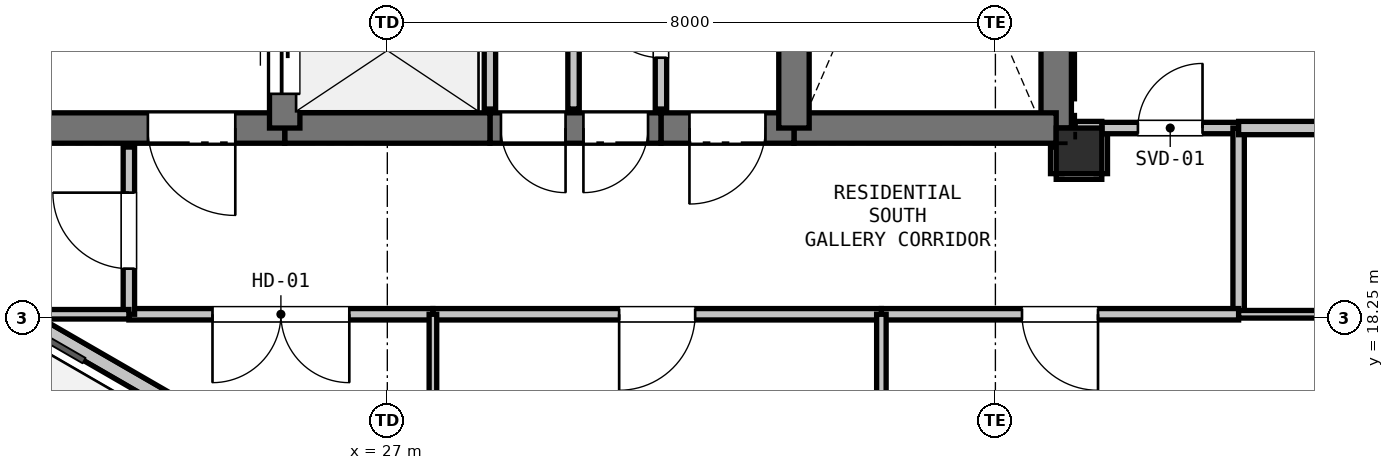
"""IFC4 building model, lengths in metres.
Left out: names, types, materials, properties, quantities, classifications, styles, units other than length and angle.
Written with IfcOpenShell. Run it as: python <this file> out.ifc"""

import sys

from ifc_helpers import new_model, si_unit, direction, frame, frame_2d, origin, origin_2d, place, context, subcontext, project, spatial, rectangle, extrude, element, fill, save


model = new_model("IFC4")
c1 = context("Model", 3, precision=1e-05, world=origin(), true_north=direction((0.0, 1.0)))
c2 = subcontext(c1, "Body", "Model", "MODEL_VIEW")
j1 = project(units=[si_unit("LENGTHUNIT", "METRE"), si_unit("PLANEANGLEUNIT", "RADIAN")], contexts=[c1])
p1 = place(None, origin())
s1 = spatial("IfcSite", under=j1, at=p1, CompositionType="ELEMENT")
p2 = place(p1, origin())
s2 = spatial("IfcBuilding", under=s1, at=p2, CompositionType="ELEMENT")
p3 = place(p2, frame((0.0, 0.0, 246.3)))
s3 = spatial("IfcBuildingStorey", under=s2, at=p3, CompositionType="ELEMENT", Elevation=246.3)
p4 = place(p3, frame((36.1, 20.45, 0.0), z_axis=(0.0, 0.0, 1.0), x_axis=(1.0, 0.0, 0.0)))
e1 = element("IfcColumn", 1, at=p4, inside=s3, PredefinedType="COLUMN", context=c2, shape_type="SweptSolid", body=[
    extrude(rectangle(XDim=0.6, YDim=0.6, at=origin_2d()), origin(), (0.0, 0.0, 1.0), 3.3),
])
p5 = place(p3, frame((27.191, 15.389, 0.0), z_axis=(0.0, 0.0, 1.0), x_axis=(-0.866019557082, 0.500010126649, 0.0)))
e2 = element("IfcWall", 2, at=p5, inside=s3, PredefinedType="PARAPET", context=c2, shape_type="SweptSolid", body=[
    extrude(rectangle(XDim=8.228, YDim=0.2, at=frame_2d((4.114, 0.0))), origin(), (0.0, 0.0, 1.0), 0.2),
])
p6 = place(p3, frame((35.8, 28.1, 0.0), z_axis=(0.0, 0.0, 1.0), x_axis=(0.0, -1.0, 0.0)))
e3 = element("IfcWall", 3, at=p6, inside=s3, PredefinedType="SHEAR", context=c2, shape_type="SweptSolid", body=[
    extrude(rectangle(XDim=7.35, YDim=0.4, at=frame_2d((3.675, 0.0))), origin(), (0.0, 0.0, 1.0), 3.02),
])
p7 = place(p3, frame((35.8, 20.75, 0.0), z_axis=(0.0, 0.0, 1.0), x_axis=(-1.0, 0.0, 0.0)))
e4 = element("IfcWall", 4, at=p7, inside=s3, PredefinedType="SHEAR", context=c2, shape_type="SweptSolid", body=[
    extrude(rectangle(XDim=3.45, YDim=0.4, at=frame_2d((1.725, 0.0))), origin(), (0.0, 0.0, 1.0), 3.02),
])
p8 = place(p3, frame((32.35, 20.75, 0.0), z_axis=(0.0, 0.0, 1.0), x_axis=(-1.0, 0.0, 0.0)))
e5 = element("IfcWall", 5, at=p8, inside=s3, PredefinedType="SHEAR", context=c2, shape_type="SweptSolid", body=[
    extrude(rectangle(XDim=1.75, YDim=0.4, at=frame_2d((0.875, 0.0))), origin(), (0.0, 0.0, 1.0), 3.02),
])
p9 = place(p8, frame((0.375, 0.0, 0.0)))
e6 = element("IfcOpeningElement", 6, at=p9, cuts=e5, PredefinedType="OPENING", context=c2, shape_type="SweptSolid", body=[
    extrude(rectangle(XDim=1.0, YDim=2.15, at=frame_2d((0.5, 1.075))), frame((0.0, 0.21, 0.0), z_axis=(0.0, -1.0, 0.0), x_axis=(1.0, 0.0, 0.0)), (0.0, 0.0, 1.0), 0.42),
])
p10 = place(p3, frame((30.6, 20.75, 0.0), z_axis=(0.0, 0.0, 1.0), x_axis=(-1.0, 0.0, 0.0)))
e7 = element("IfcWall", 7, at=p10, inside=s3, PredefinedType="SHEAR", context=c2, shape_type="SweptSolid", body=[
    extrude(rectangle(XDim=2.25, YDim=0.4, at=frame_2d((1.125, 0.0))), origin(), (0.0, 0.0, 1.0), 3.02),
])
p11 = place(p10, frame((1.255, 0.0, 0.0)))
e8 = element("IfcOpeningElement", 8, at=p11, cuts=e7, PredefinedType="OPENING", context=c2, shape_type="SweptSolid", body=[
    extrude(rectangle(XDim=0.85, YDim=2.1, at=frame_2d((0.425, 1.05))), frame((0.0, 0.21, 0.0), z_axis=(0.0, -1.0, 0.0), x_axis=(1.0, 0.0, 0.0)), (0.0, 0.0, 1.0), 0.42),
])
p12 = place(p10, frame((0.17, 0.0, 0.0)))
e9 = element("IfcOpeningElement", 9, at=p12, cuts=e7, PredefinedType="OPENING", context=c2, shape_type="SweptSolid", body=[
    extrude(rectangle(XDim=0.85, YDim=2.1, at=frame_2d((0.425, 1.05))), frame((0.0, 0.21, 0.0), z_axis=(0.0, -1.0, 0.0), x_axis=(1.0, 0.0, 0.0)), (0.0, 0.0, 1.0), 0.42),
])
p13 = place(p3, frame((28.35, 20.75, 0.0), z_axis=(0.0, 0.0, 1.0), x_axis=(-1.0, 0.0, 0.0)))
e10 = element("IfcWall", 10, at=p13, inside=s3, PredefinedType="SHEAR", context=c2, shape_type="SweptSolid", body=[
    extrude(rectangle(XDim=2.7, YDim=0.4, at=frame_2d((1.35, 0.0))), origin(), (0.0, 0.0, 1.0), 3.02),
])
p14 = place(p3, frame((25.65, 20.75, 0.0), z_axis=(0.0, 0.0, 1.0), x_axis=(-1.0, 0.0, 0.0)))
e11 = element("IfcWall", 11, at=p14, inside=s3, PredefinedType="SHEAR", context=c2, shape_type="SweptSolid", body=[
    extrude(rectangle(XDim=3.45, YDim=0.4, at=frame_2d((1.725, 0.0))), origin(), (0.0, 0.0, 1.0), 3.02),
])
p15 = place(p14, frame((0.65, 0.0, 0.0)))
e12 = element("IfcOpeningElement", 12, at=p15, cuts=e11, PredefinedType="OPENING", context=c2, shape_type="SweptSolid", body=[
    extrude(rectangle(XDim=1.15, YDim=2.15, at=frame_2d((0.575, 1.075))), frame((0.0, 0.21, 0.0), z_axis=(0.0, -1.0, 0.0), x_axis=(1.0, 0.0, 0.0)), (0.0, 0.0, 1.0), 0.42),
])
p16 = place(p3, frame((25.65, 20.75, 0.0), z_axis=(0.0, 0.0, 1.0), x_axis=(0.0, 1.0, 0.0)))
e13 = element("IfcWall", 13, at=p16, inside=s3, PredefinedType="SHEAR", context=c2, shape_type="SweptSolid", body=[
    extrude(rectangle(XDim=2.0, YDim=0.4, at=frame_2d((1.0, 0.0))), origin(), (0.0, 0.0, 1.0), 3.02),
])
p17 = place(p16, frame((0.45, 0.0, 0.0)))
e14 = element("IfcOpeningElement", 14, at=p17, cuts=e13, PredefinedType="OPENING", context=c2, shape_type="SweptSolid", body=[
    extrude(rectangle(XDim=1.1, YDim=2.15, at=frame_2d((0.55, 1.075))), frame((0.0, 0.21, 0.0), z_axis=(0.0, -1.0, 0.0), x_axis=(1.0, 0.0, 0.0)), (0.0, 0.0, 1.0), 0.42),
])
p18 = place(p3, frame((32.35, 20.75, 0.0), z_axis=(0.0, 0.0, 1.0), x_axis=(0.0, 1.0, 0.0)))
e15 = element("IfcWall", 15, at=p18, inside=s3, PredefinedType="SHEAR", context=c2, shape_type="SweptSolid", body=[
    extrude(rectangle(XDim=4.8, YDim=0.4, at=frame_2d((2.4, 0.0))), origin(), (0.0, 0.0, 1.0), 3.02),
])
p19 = place(p3, frame((28.35, 23.2, 0.0), z_axis=(0.0, 0.0, 1.0), x_axis=(0.0, -1.0, 0.0)))
e16 = element("IfcWall", 16, at=p19, inside=s3, PredefinedType="PARTITIONING", context=c2, shape_type="SweptSolid", body=[
    extrude(rectangle(XDim=2.2, YDim=0.15, at=frame_2d((1.1, 0.0))), origin(), (0.0, 0.0, 1.0), 3.02),
])
p20 = place(p3, frame((30.6, 21.0, 0.0), z_axis=(0.0, 0.0, 1.0), x_axis=(0.0, 1.0, 0.0)))
e17 = element("IfcWall", 17, at=p20, inside=s3, PredefinedType="PARTITIONING", context=c2, shape_type="SweptSolid", body=[
    extrude(rectangle(XDim=2.2, YDim=0.15, at=frame_2d((1.1, 0.0))), origin(), (0.0, 0.0, 1.0), 3.02),
])
p21 = place(p20, frame((0.675, 0.0, 0.0)))
e18 = element("IfcOpeningElement", 18, at=p21, cuts=e17, PredefinedType="OPENING", context=c2, shape_type="SweptSolid", body=[
    extrude(rectangle(XDim=0.85, YDim=2.1, at=frame_2d((0.425, 1.05))), frame((0.0, 0.085, 0.0), z_axis=(0.0, -1.0, 0.0), x_axis=(1.0, 0.0, 0.0)), (0.0, 0.0, 1.0), 0.17),
])
p22 = place(p3, frame((35.8, 20.15, 0.0), z_axis=(0.0, 0.0, 1.0), x_axis=(1.0, 0.0, 0.0)))
e19 = element("IfcWall", 19, at=p22, inside=s3, PredefinedType="PARTITIONING", context=c2, shape_type="SweptSolid", body=[
    extrude(rectangle(XDim=0.6, YDim=0.15, at=frame_2d((0.3, 0.0))), origin(), (0.0, 0.0, 1.0), 2.468),
])
p23 = place(p3, frame((36.4, 20.15, 0.0), z_axis=(0.0, 0.0, 1.0), x_axis=(0.0, 1.0, 0.0)))
e20 = element("IfcWall", 20, at=p23, inside=s3, PredefinedType="PARTITIONING", context=c2, shape_type="SweptSolid", body=[
    extrude(rectangle(XDim=0.6, YDim=0.15, at=frame_2d((0.3, 0.0))), origin(), (0.0, 0.0, 1.0), 3.02),
])
p24 = place(p3, frame((36.4, 20.75, 0.0), z_axis=(0.0, 0.0, 1.0), x_axis=(1.0, 0.0, 0.0)))
e21 = element("IfcWall", 21, at=p24, inside=s3, PredefinedType="PARTITIONING", context=c2, shape_type="SweptSolid", body=[
    extrude(rectangle(XDim=1.8, YDim=0.15, at=frame_2d((0.9, 0.0))), origin(), (0.0, 0.0, 1.0), 3.02),
])
p25 = place(p24, frame((0.475, 0.0, 0.0)))
e22 = element("IfcOpeningElement", 22, at=p25, cuts=e21, PredefinedType="OPENING", context=c2, shape_type="SweptSolid", body=[
    extrude(rectangle(XDim=0.85, YDim=2.1, at=frame_2d((0.425, 1.05))), frame((0.0, 0.085, 0.0), z_axis=(0.0, -1.0, 0.0), x_axis=(1.0, 0.0, 0.0)), (0.0, 0.0, 1.0), 0.17),
])
p26 = place(p3, frame((38.2, 20.75, 0.0), z_axis=(0.0, 0.0, 1.0), x_axis=(0.0, -1.0, 0.0)))
e23 = element("IfcWall", 23, at=p26, inside=s3, PredefinedType="PARTITIONING", context=c2, shape_type="SweptSolid", body=[
    extrude(rectangle(XDim=2.45, YDim=0.15, at=frame_2d((1.225, 0.0))), origin(), (0.0, 0.0, 1.0), 3.02),
])
p27 = place(p3, frame((38.2, 18.3, 0.0), z_axis=(0.0, 0.0, 1.0), x_axis=(-1.0, 0.0, 0.0)))
e24 = element("IfcWall", 24, at=p27, inside=s3, PredefinedType="PARTITIONING", context=c2, shape_type="SweptSolid", body=[
    extrude(rectangle(XDim=4.7, YDim=0.15, at=frame_2d((2.35, 0.0))), origin(), (0.0, 0.0, 1.0), 2.468),
])
p28 = place(p27, frame((1.85, 0.0, 0.0)))
e25 = element("IfcOpeningElement", 25, at=p28, cuts=e24, PredefinedType="OPENING", context=c2, shape_type="SweptSolid", body=[
    extrude(rectangle(XDim=1.0, YDim=2.15, at=frame_2d((0.5, 1.075))), frame((0.0, 0.085, 0.0), z_axis=(0.0, -1.0, 0.0), x_axis=(1.0, 0.0, 0.0)), (0.0, 0.0, 1.0), 0.17),
])
p29 = place(p3, frame((33.5, 18.3, 0.0), z_axis=(0.0, 0.0, 1.0), x_axis=(-1.0, 0.0, 0.0)))
e26 = element("IfcWall", 26, at=p29, inside=s3, PredefinedType="PARTITIONING", context=c2, shape_type="SweptSolid", body=[
    extrude(rectangle(XDim=5.9, YDim=0.15, at=frame_2d((2.95, 0.0))), origin(), (0.0, 0.0, 1.0), 3.02),
])
p30 = place(p29, frame((2.45, 0.0, 0.0)))
e27 = element("IfcOpeningElement", 27, at=p30, cuts=e26, PredefinedType="OPENING", context=c2, shape_type="SweptSolid", body=[
    extrude(rectangle(XDim=1.0, YDim=2.15, at=frame_2d((0.5, 1.075))), frame((0.0, 0.085, 0.0), z_axis=(0.0, -1.0, 0.0), x_axis=(1.0, 0.0, 0.0)), (0.0, 0.0, 1.0), 0.17),
])
p31 = place(p3, frame((27.6, 18.3, 0.0), z_axis=(0.0, 0.0, 1.0), x_axis=(-1.0, 0.0, 0.0)))
e28 = element("IfcWall", 28, at=p31, inside=s3, PredefinedType="PARTITIONING", context=c2, shape_type="SweptSolid", body=[
    extrude(rectangle(XDim=4.0, YDim=0.15, at=frame_2d((2.0, 0.0))), origin(), (0.0, 0.0, 1.0), 2.365),
])
p32 = place(p31, frame((1.1, 0.0, 0.0)))
e29 = element("IfcOpeningElement", 29, at=p32, cuts=e28, PredefinedType="OPENING", context=c2, shape_type="SweptSolid", body=[
    extrude(rectangle(XDim=1.8, YDim=2.2, at=frame_2d((0.9, 1.1))), frame((0.0, 0.085, 0.0), z_axis=(0.0, -1.0, 0.0), x_axis=(1.0, 0.0, 0.0)), (0.0, 0.0, 1.0), 0.17),
])
p33 = place(p3, frame((23.6, 18.3, 0.0), z_axis=(0.0, 0.0, 1.0), x_axis=(0.0, 1.0, 0.0)))
e30 = element("IfcWall", 30, at=p33, inside=s3, PredefinedType="PARTITIONING", context=c2, shape_type="SweptSolid", body=[
    extrude(rectangle(XDim=2.2, YDim=0.15, at=frame_2d((1.1, 0.0))), origin(), (0.0, 0.0, 1.0), 2.468),
])
p34 = place(p33, frame((0.6, 0.0, 0.0)))
e31 = element("IfcOpeningElement", 31, at=p34, cuts=e30, PredefinedType="OPENING", context=c2, shape_type="SweptSolid", body=[
    extrude(rectangle(XDim=1.0, YDim=2.15, at=frame_2d((0.5, 1.075))), frame((0.0, 0.085, 0.0), z_axis=(0.0, -1.0, 0.0), x_axis=(1.0, 0.0, 0.0)), (0.0, 0.0, 1.0), 0.17),
])
p35 = place(p3, frame((35.8, 20.5, 0.0), z_axis=(0.0, 0.0, 1.0), x_axis=(0.0, -1.0, 0.0)))
e32 = element("IfcWall", 32, at=p35, inside=s3, PredefinedType="PARTITIONING", context=c2, shape_type="SweptSolid", body=[
    extrude(rectangle(XDim=0.35, YDim=0.15, at=frame_2d((0.175, 0.0))), origin(), (0.0, 0.0, 1.0), 2.545),
])
p36 = place(p3, frame((39.606, 20.75, 0.0), z_axis=(0.0, 0.0, 1.0), x_axis=(-1.0, 0.0, 0.0)))
e33 = element("IfcWall", 33, at=p36, inside=s3, PredefinedType="PLUMBINGWALL", context=c2, shape_type="SweptSolid", body=[
    extrude(rectangle(XDim=1.406, YDim=0.175, at=frame_2d((0.703, 0.0))), origin(), (0.0, 0.0, 1.0), 2.365),
])
p37 = place(p3, frame((36.4, 20.75, 0.0), z_axis=(0.0, 0.0, 1.0), x_axis=(-1.0, 0.0, 0.0)))
e34 = element("IfcWall", 34, at=p37, inside=s3, PredefinedType="PLUMBINGWALL", context=c2, shape_type="SweptSolid", body=[
    extrude(rectangle(XDim=0.35, YDim=0.175, at=frame_2d((0.175, 0.0))), origin(), (0.0, 0.0, 1.0), 2.545),
])
p38 = place(p3, frame((29.45, 23.2, 0.0), z_axis=(0.0, 0.0, 1.0), x_axis=(0.0, -1.0, 0.0)))
e35 = element("IfcWall", 35, at=p38, inside=s3, PredefinedType="PARTITIONING", context=c2, shape_type="SweptSolid", body=[
    extrude(rectangle(XDim=2.2, YDim=0.15, at=frame_2d((1.1, 0.0))), origin(), (0.0, 0.0, 1.0), 3.02),
])
p39 = place(p3, frame((22.223, 18.3, 0.0), z_axis=(0.0, 0.0, 1.0), x_axis=(1.0, 0.0, 0.0)))
e36 = element("IfcWall", 36, at=p39, inside=s3, PredefinedType="PARTITIONING", context=c2, shape_type="SweptSolid", body=[
    extrude(rectangle(XDim=1.377, YDim=0.125, at=frame_2d((0.688, 0.0))), origin(), (0.0, 0.0, 1.0), 2.365),
])
p40 = place(p3, frame((27.6, 18.3, 0.0), z_axis=(0.0, 0.0, 1.0), x_axis=(0.0, -1.0, 0.0)))
e37 = element("IfcWall", 37, at=p40, inside=s3, PredefinedType="PARTITIONING", context=c2, shape_type="SweptSolid", body=[
    extrude(rectangle(XDim=2.795, YDim=0.1, at=frame_2d((1.398, 0.0))), origin(), (0.0, 0.0, 1.0), 2.365),
])
p41 = place(p3, frame((33.5, 18.3, 0.0), z_axis=(0.0, 0.0, 1.0), x_axis=(0.0, -1.0, 0.0)))
e38 = element("IfcWall", 38, at=p41, inside=s3, PredefinedType="PARTITIONING", context=c2, shape_type="SweptSolid", body=[
    extrude(rectangle(XDim=6.395, YDim=0.125, at=frame_2d((3.198, 0.0))), origin(), (0.0, 0.0, 1.0), 2.745),
])
p42 = place(p3, frame((38.2, 18.3, 0.0), z_axis=(0.0, 0.0, 1.0), x_axis=(1.0, 0.0, 0.0)))
e39 = element("IfcWall", 39, at=p42, inside=s3, PredefinedType="PARTITIONING", context=c2, shape_type="SweptSolid", body=[
    extrude(rectangle(XDim=1.406, YDim=0.1, at=frame_2d((0.703, 0.0))), origin(), (0.0, 0.0, 1.0), 2.365),
])
p43 = place(p9, origin())
e40 = element("IfcDoor", 40, at=p43, inside=s3, OperationType="SINGLE_SWING_RIGHT", PredefinedType="DOOR", context=c2, shape_type="SweptSolid", body=[
    extrude(rectangle(XDim=1.0, YDim=2.15, at=frame_2d((0.5, 1.075))), frame((0.0, 0.025, 0.0), z_axis=(0.0, -1.0, 0.0), x_axis=(1.0, 0.0, 0.0)), (0.0, 0.0, 1.0), 0.05),
])
fill(e6, e40)
p44 = place(p17, origin())
e41 = element("IfcDoor", 41, at=p44, inside=s3, OperationType="SLIDING_TO_LEFT", PredefinedType="DOOR", context=c2, shape_type="SweptSolid", body=[
    extrude(rectangle(XDim=1.1, YDim=2.15, at=frame_2d((0.55, 1.075))), frame((0.0, 0.025, 0.0), z_axis=(0.0, -1.0, 0.0), x_axis=(1.0, 0.0, 0.0)), (0.0, 0.0, 1.0), 0.05),
])
fill(e14, e41)
p45 = place(p15, origin())
e42 = element("IfcDoor", 42, at=p45, inside=s3, OperationType="SINGLE_SWING_LEFT", PredefinedType="DOOR", context=c2, shape_type="SweptSolid", body=[
    extrude(rectangle(XDim=1.15, YDim=2.15, at=frame_2d((0.575, 1.075))), frame((0.0, 0.025, 0.0), z_axis=(0.0, -1.0, 0.0), x_axis=(1.0, 0.0, 0.0)), (0.0, 0.0, 1.0), 0.05),
])
fill(e12, e42)
p46 = place(p21, origin())
e43 = element("IfcDoor", 43, at=p46, inside=s3, OperationType="SINGLE_SWING_RIGHT", PredefinedType="DOOR", context=c2, shape_type="SweptSolid", body=[
    extrude(rectangle(XDim=0.85, YDim=2.1, at=frame_2d((0.425, 1.05))), frame((0.0, 0.025, 0.0), z_axis=(0.0, -1.0, 0.0), x_axis=(1.0, 0.0, 0.0)), (0.0, 0.0, 1.0), 0.05),
])
fill(e18, e43)
p47 = place(p25, origin())
e44 = element("IfcDoor", 44, at=p47, inside=s3, OperationType="SINGLE_SWING_RIGHT", PredefinedType="DOOR", context=c2, shape_type="SweptSolid", body=[
    extrude(rectangle(XDim=0.85, YDim=2.1, at=frame_2d((0.425, 1.05))), frame((0.0, 0.025, 0.0), z_axis=(0.0, -1.0, 0.0), x_axis=(1.0, 0.0, 0.0)), (0.0, 0.0, 1.0), 0.05),
])
fill(e22, e44)
p48 = place(p11, origin())
e45 = element("IfcDoor", 45, at=p48, inside=s3, OperationType="SINGLE_SWING_LEFT", PredefinedType="DOOR", context=c2, shape_type="SweptSolid", body=[
    extrude(rectangle(XDim=0.85, YDim=2.1, at=frame_2d((0.425, 1.05))), frame((0.0, 0.025, 0.0), z_axis=(0.0, -1.0, 0.0), x_axis=(1.0, 0.0, 0.0)), (0.0, 0.0, 1.0), 0.05),
])
fill(e8, e45)
p49 = place(p12, origin())
e46 = element("IfcDoor", 46, at=p49, inside=s3, OperationType="SINGLE_SWING_RIGHT", PredefinedType="DOOR", context=c2, shape_type="SweptSolid", body=[
    extrude(rectangle(XDim=0.85, YDim=2.1, at=frame_2d((0.425, 1.05))), frame((0.0, 0.025, 0.0), z_axis=(0.0, -1.0, 0.0), x_axis=(1.0, 0.0, 0.0)), (0.0, 0.0, 1.0), 0.05),
])
fill(e9, e46)
p50 = place(p32, origin())
e47 = element("IfcDoor", 47, at=p50, inside=s3, OperationType="DOUBLE_DOOR_SINGLE_SWING", PredefinedType="DOOR", context=c2, shape_type="SweptSolid", body=[
    extrude(rectangle(XDim=1.8, YDim=2.2, at=frame_2d((0.9, 1.1))), frame((0.0, 0.025, 0.0), z_axis=(0.0, -1.0, 0.0), x_axis=(1.0, 0.0, 0.0)), (0.0, 0.0, 1.0), 0.05),
])
fill(e29, e47)
p51 = place(p30, origin())
e48 = element("IfcDoor", 48, at=p51, inside=s3, OperationType="SINGLE_SWING_RIGHT", PredefinedType="DOOR", context=c2, shape_type="SweptSolid", body=[
    extrude(rectangle(XDim=1.0, YDim=2.15, at=frame_2d((0.5, 1.075))), frame((0.0, 0.025, 0.0), z_axis=(0.0, -1.0, 0.0), x_axis=(1.0, 0.0, 0.0)), (0.0, 0.0, 1.0), 0.05),
])
fill(e27, e48)
p52 = place(p28, origin())
e49 = element("IfcDoor", 49, at=p52, inside=s3, OperationType="SINGLE_SWING_LEFT", PredefinedType="DOOR", context=c2, shape_type="SweptSolid", body=[
    extrude(rectangle(XDim=1.0, YDim=2.15, at=frame_2d((0.5, 1.075))), frame((0.0, 0.025, 0.0), z_axis=(0.0, -1.0, 0.0), x_axis=(1.0, 0.0, 0.0)), (0.0, 0.0, 1.0), 0.05),
])
fill(e25, e49)
p53 = place(p34, origin())
e50 = element("IfcDoor", 50, at=p53, inside=s3, OperationType="SINGLE_SWING_RIGHT", PredefinedType="DOOR", context=c2, shape_type="SweptSolid", body=[
    extrude(rectangle(XDim=1.0, YDim=2.15, at=frame_2d((0.5, 1.075))), frame((0.0, 0.025, 0.0), z_axis=(0.0, -1.0, 0.0), x_axis=(1.0, 0.0, 0.0)), (0.0, 0.0, 1.0), 0.05),
])
fill(e31, e50)
save(model, sys.argv[1])
